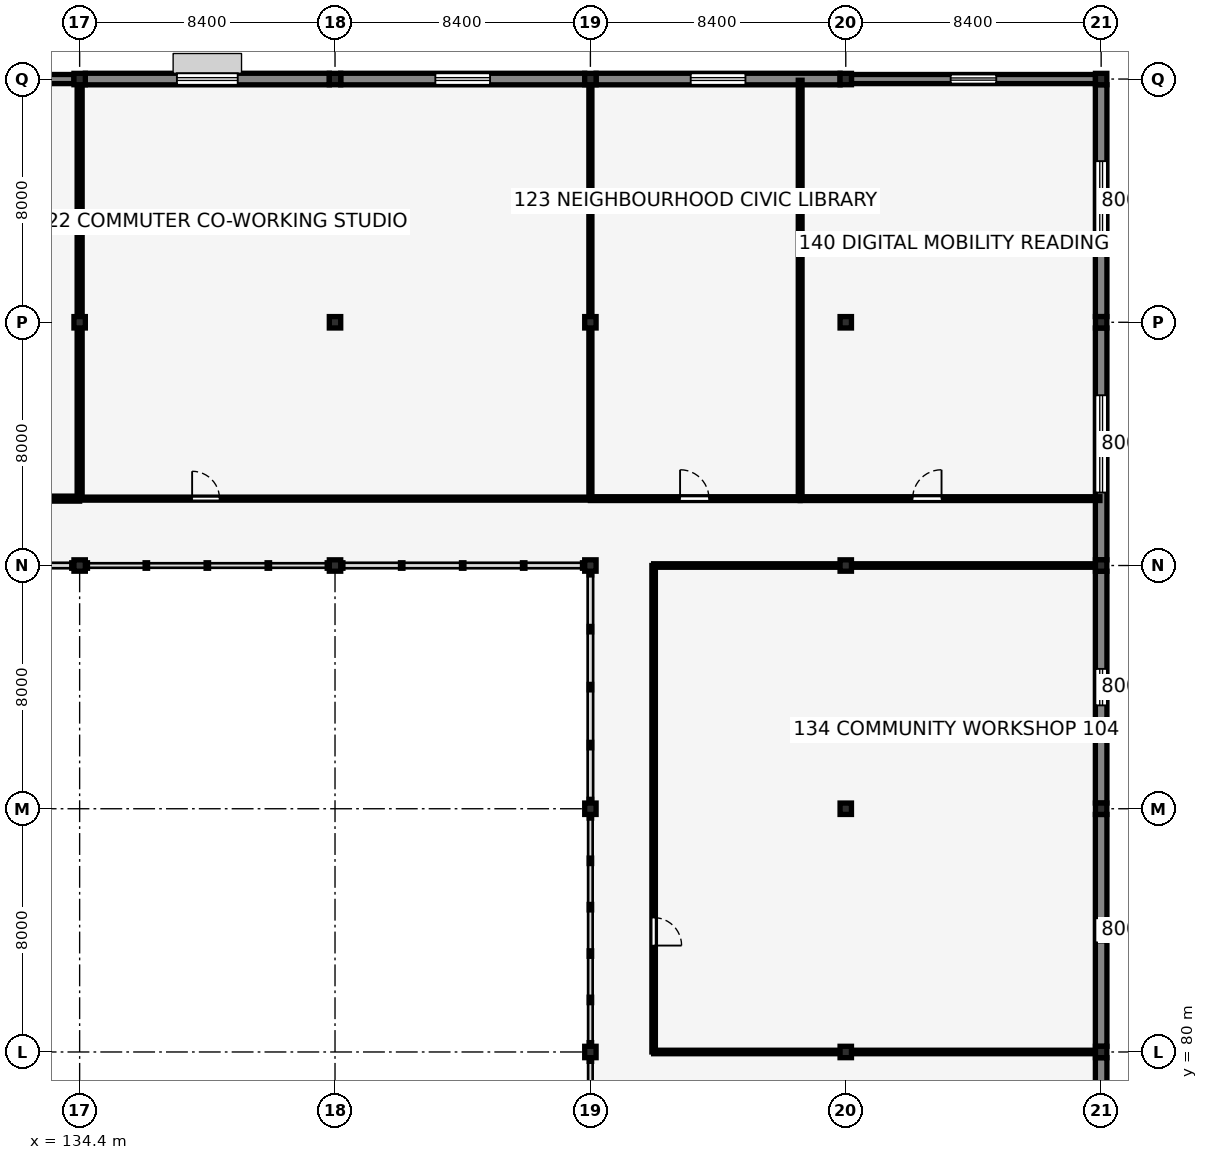
"""IFC4 building model, lengths in metres.
Left out: names, types, materials, properties, quantities, classifications, styles, units other than length and angle.
Written with IfcOpenShell. Run it as: python <this file> out.ifc"""

import sys

from ifc_helpers import new_model, si_unit, direction, frame, frame_2d, origin, origin_2d, place, context, subcontext, project, spatial, rectangle, i_section, extrude, element, fill, save


model = new_model("IFC4")
c1 = context("Model", 3, precision=1e-05, world=origin(), true_north=direction((0.0, 1.0)))
c2 = subcontext(c1, "Body", "Model", "MODEL_VIEW")
j1 = project(units=[si_unit("LENGTHUNIT", "METRE"), si_unit("PLANEANGLEUNIT", "RADIAN")], contexts=[c1])
p1 = place(None, origin())
s1 = spatial("IfcSite", under=j1, at=p1, CompositionType="ELEMENT")
p2 = place(p1, origin())
s2 = spatial("IfcBuilding", under=s1, at=p2, CompositionType="ELEMENT")
p3 = place(p2, frame((0.0, 0.0, 5.44)))
s3 = spatial("IfcBuildingStorey", under=s2, at=p3, CompositionType="ELEMENT", Elevation=5.44)
for number, where, z_axis, x_axis in (
    (1, (134.4, 96.0, 0.0), (0.0, 0.0, 1.0), (1.0, 0.0, 0.0)),
    (2, (134.4, 104.0, 0.0), (0.0, 0.0, 1.0), (1.0, 0.0, 0.0)),
    (3, (134.4, 112.0, 0.0), (0.0, 0.0, 1.0), (1.0, 0.0, 0.0)),
    (4, (142.8, 96.0, 0.0), (0.0, 0.0, 1.0), (1.0, 0.0, 0.0)),
    (5, (142.8, 104.0, 0.0), (0.0, 0.0, 1.0), (1.0, 0.0, 0.0)),
    (6, (142.8, 112.0, 0.0), (0.0, 0.0, 1.0), (1.0, 0.0, 0.0)),
    (7, (151.2, 80.0, 0.0), (0.0, 0.0, 1.0), (1.0, 0.0, 0.0)),
    (8, (151.2, 88.0, 0.0), (0.0, 0.0, 1.0), (1.0, 0.0, 0.0)),
    (9, (151.2, 96.0, 0.0), (0.0, 0.0, 1.0), (1.0, 0.0, 0.0)),
    (10, (151.2, 104.0, 0.0), (0.0, 0.0, 1.0), (1.0, 0.0, 0.0)),
    (11, (151.2, 112.0, 0.0), (0.0, 0.0, 1.0), (1.0, 0.0, 0.0)),
    (12, (159.6, 80.0, 0.0), (0.0, 0.0, 1.0), (1.0, 0.0, 0.0)),
    (13, (159.6, 88.0, 0.0), (0.0, 0.0, 1.0), (1.0, 0.0, 0.0)),
    (14, (159.6, 96.0, 0.0), (0.0, 0.0, 1.0), (1.0, 0.0, 0.0)),
    (15, (159.6, 104.0, 0.0), (0.0, 0.0, 1.0), (1.0, 0.0, 0.0)),
    (16, (159.6, 112.0, 0.0), (0.0, 0.0, 1.0), (1.0, 0.0, 0.0)),
    (17, (168.0, 80.0, 0.0), (0.0, 0.0, 1.0), (1.0, 0.0, 0.0)),
    (18, (168.0, 88.0, 0.0), (0.0, 0.0, 1.0), (1.0, 0.0, 0.0)),
    (19, (168.0, 96.0, 0.0), (0.0, 0.0, 1.0), (1.0, 0.0, 0.0)),
    (20, (168.0, 104.0, 0.0), (0.0, 0.0, 1.0), (1.0, 0.0, 0.0)),
    (21, (168.0, 112.0, 0.0), (0.0, 0.0, 1.0), (1.0, 0.0, 0.0)),
):
    element("IfcColumn", number, at=place(p3, frame(where, z_axis=z_axis, x_axis=x_axis)), inside=s3, PredefinedType="COLUMN", context=c2, shape_type="SweptSolid", body=[
        extrude(i_section(OverallWidth=0.375, OverallDepth=0.375, WebThickness=0.017, FlangeThickness=0.027, FilletRadius=0.015, at=origin_2d()), origin(), (0.0, 0.0, 1.0), 3.8),
    ])
p4 = place(p3, frame((126.187, 112.0, 0.0), z_axis=(0.0, 0.0, 1.0), x_axis=(1.0, 0.0, 0.0)))
e22 = element("IfcWall", 22, at=p4, inside=s3, PredefinedType="SOLIDWALL", context=c2, shape_type="SweptSolid", body=[
    extrude(rectangle(XDim=8.025, YDim=0.3, at=frame_2d((4.013, 0.0))), origin(), (0.0, 0.0, 1.0), 3.45),
])
p5 = place(p4, frame((2.913, 0.0, 0.9), z_axis=(0.0, 0.0, 1.0), x_axis=(1.0, 0.0, 0.0)))
e23 = element("IfcOpeningElement", 23, at=p5, cuts=e22, PredefinedType="OPENING", context=c2, shape_type="SweptSolid", body=[
    extrude(rectangle(XDim=2.2, YDim=1.5, at=frame_2d((1.1, 0.75))), frame((0.0, 0.16, 0.0), z_axis=(0.0, -1.0, 0.0), x_axis=(1.0, 0.0, 0.0)), (0.0, 0.0, 1.0), 0.32),
])
p6 = place(p3, frame((134.587, 112.0, 0.0), z_axis=(0.0, 0.0, 1.0), x_axis=(1.0, 0.0, 0.0)))
e24 = element("IfcWall", 24, at=p6, inside=s3, PredefinedType="SOLIDWALL", context=c2, shape_type="SweptSolid", body=[
    extrude(rectangle(XDim=8.025, YDim=0.38, at=frame_2d((4.013, 0.0))), origin(), (0.0, 0.0, 1.0), 3.45),
])
p7 = place(p6, frame((3.013, 0.0, 0.9), z_axis=(0.0, 0.0, 1.0), x_axis=(1.0, 0.0, 0.0)))
e25 = element("IfcOpeningElement", 25, at=p7, cuts=e24, PredefinedType="OPENING", context=c2, shape_type="SweptSolid", body=[
    extrude(rectangle(XDim=2.0, YDim=1.5, at=frame_2d((1.0, 0.75))), frame((0.0, 0.2, 0.0), z_axis=(0.0, -1.0, 0.0), x_axis=(1.0, 0.0, 0.0)), (0.0, 0.0, 1.0), 0.4),
])
p8 = place(p3, frame((142.987, 112.0, 0.0), z_axis=(0.0, 0.0, 1.0), x_axis=(1.0, 0.0, 0.0)))
e26 = element("IfcWall", 26, at=p8, inside=s3, PredefinedType="SOLIDWALL", context=c2, shape_type="SweptSolid", body=[
    extrude(rectangle(XDim=8.025, YDim=0.38, at=frame_2d((4.013, 0.0))), origin(), (0.0, 0.0, 1.0), 3.45),
])
p9 = place(p8, frame((3.113, 0.0, 0.9), z_axis=(0.0, 0.0, 1.0), x_axis=(1.0, 0.0, 0.0)))
e27 = element("IfcOpeningElement", 27, at=p9, cuts=e26, PredefinedType="OPENING", context=c2, shape_type="SweptSolid", body=[
    extrude(rectangle(XDim=1.8, YDim=1.45, at=frame_2d((0.9, 0.725))), frame((0.0, 0.2, 0.0), z_axis=(0.0, -1.0, 0.0), x_axis=(1.0, 0.0, 0.0)), (0.0, 0.0, 1.0), 0.4),
])
p10 = place(p3, frame((151.387, 112.0, 0.0), z_axis=(0.0, 0.0, 1.0), x_axis=(1.0, 0.0, 0.0)))
e28 = element("IfcWall", 28, at=p10, inside=s3, PredefinedType="SOLIDWALL", context=c2, shape_type="SweptSolid", body=[
    extrude(rectangle(XDim=8.025, YDim=0.38, at=frame_2d((4.013, 0.0))), origin(), (0.0, 0.0, 1.0), 3.45),
])
p11 = place(p10, frame((3.113, 0.0, 0.9), z_axis=(0.0, 0.0, 1.0), x_axis=(1.0, 0.0, 0.0)))
e29 = element("IfcOpeningElement", 29, at=p11, cuts=e28, PredefinedType="OPENING", context=c2, shape_type="SweptSolid", body=[
    extrude(rectangle(XDim=1.8, YDim=1.3, at=frame_2d((0.9, 0.65))), frame((0.0, 0.2, 0.0), z_axis=(0.0, -1.0, 0.0), x_axis=(1.0, 0.0, 0.0)), (0.0, 0.0, 1.0), 0.4),
])
p12 = place(p3, frame((159.787, 112.0, 0.0), z_axis=(0.0, 0.0, 1.0), x_axis=(1.0, 0.0, 0.0)))
e30 = element("IfcWall", 30, at=p12, inside=s3, PredefinedType="SOLIDWALL", context=c2, shape_type="SweptSolid", body=[
    extrude(rectangle(XDim=8.025, YDim=0.3, at=frame_2d((4.013, 0.0))), origin(), (0.0, 0.0, 1.0), 3.45),
])
p13 = place(p12, frame((3.263, 0.0, 0.9), z_axis=(0.0, 0.0, 1.0), x_axis=(1.0, 0.0, 0.0)))
e31 = element("IfcOpeningElement", 31, at=p13, cuts=e30, PredefinedType="OPENING", context=c2, shape_type="SweptSolid", body=[
    extrude(rectangle(XDim=1.5, YDim=1.4, at=frame_2d((0.75, 0.7))), frame((0.0, 0.16, 0.0), z_axis=(0.0, -1.0, 0.0), x_axis=(1.0, 0.0, 0.0)), (0.0, 0.0, 1.0), 0.32),
])
p14 = place(p3, frame((168.0, 96.187, 0.0), z_axis=(0.0, 0.0, 1.0), x_axis=(0.0, 1.0, 0.0)))
e32 = element("IfcWall", 32, at=p14, inside=s3, PredefinedType="SOLIDWALL", context=c2, shape_type="SweptSolid", body=[
    extrude(rectangle(XDim=7.625, YDim=0.38, at=frame_2d((3.813, 0.0))), origin(), (0.0, 0.0, 1.0), 3.442),
])
p15 = place(p14, frame((2.213, 0.0, 1.55), z_axis=(0.0, 0.0, 1.0), x_axis=(1.0, 0.0, 0.0)))
e33 = element("IfcOpeningElement", 33, at=p15, cuts=e32, PredefinedType="OPENING", context=c2, shape_type="SweptSolid", body=[
    extrude(rectangle(XDim=3.2, YDim=0.9, at=frame_2d((1.6, 0.45))), frame((0.0, 0.2, 0.0), z_axis=(0.0, -1.0, 0.0), x_axis=(1.0, 0.0, 0.0)), (0.0, 0.0, 1.0), 0.4),
])
p16 = place(p3, frame((168.0, 104.187, 0.0), z_axis=(0.0, 0.0, 1.0), x_axis=(0.0, 1.0, 0.0)))
e34 = element("IfcWall", 34, at=p16, inside=s3, PredefinedType="SOLIDWALL", context=c2, shape_type="SweptSolid", body=[
    extrude(rectangle(XDim=7.625, YDim=0.38, at=frame_2d((3.813, 0.0))), origin(), (0.0, 0.0, 1.0), 3.442),
])
p17 = place(p16, frame((2.513, 0.0, 1.55), z_axis=(0.0, 0.0, 1.0), x_axis=(1.0, 0.0, 0.0)))
e35 = element("IfcOpeningElement", 35, at=p17, cuts=e34, PredefinedType="OPENING", context=c2, shape_type="SweptSolid", body=[
    extrude(rectangle(XDim=2.6, YDim=0.85, at=frame_2d((1.3, 0.425))), frame((0.0, 0.2, 0.0), z_axis=(0.0, -1.0, 0.0), x_axis=(1.0, 0.0, 0.0)), (0.0, 0.0, 1.0), 0.4),
])
p18 = place(p3, frame((168.0, 72.187, 0.0), z_axis=(0.0, 0.0, 1.0), x_axis=(0.0, 1.0, 0.0)))
e36 = element("IfcWall", 36, at=p18, inside=s3, PredefinedType="SOLIDWALL", context=c2, shape_type="SweptSolid", body=[
    extrude(rectangle(XDim=7.625, YDim=0.38, at=frame_2d((3.813, 0.0))), origin(), (0.0, 0.0, 1.0), 3.5),
])
p19 = place(p3, frame((168.0, 80.187, 0.0), z_axis=(0.0, 0.0, 1.0), x_axis=(0.0, 1.0, 0.0)))
e37 = element("IfcWall", 37, at=p19, inside=s3, PredefinedType="SOLIDWALL", context=c2, shape_type="SweptSolid", body=[
    extrude(rectangle(XDim=7.625, YDim=0.38, at=frame_2d((3.813, 0.0))), origin(), (0.0, 0.0, 1.0), 3.442),
])
p20 = place(p19, frame((3.413, 0.0, 0.65), z_axis=(0.0, 0.0, 1.0), x_axis=(1.0, 0.0, 0.0)))
e38 = element("IfcOpeningElement", 38, at=p20, cuts=e37, PredefinedType="OPENING", context=c2, shape_type="SweptSolid", body=[
    extrude(rectangle(XDim=0.8, YDim=1.85, at=frame_2d((0.4, 0.925))), frame((0.0, 0.2, 0.0), z_axis=(0.0, -1.0, 0.0), x_axis=(1.0, 0.0, 0.0)), (0.0, 0.0, 1.0), 0.4),
])
p21 = place(p3, frame((168.0, 88.187, 0.0), z_axis=(0.0, 0.0, 1.0), x_axis=(0.0, 1.0, 0.0)))
e39 = element("IfcWall", 39, at=p21, inside=s3, PredefinedType="SOLIDWALL", context=c2, shape_type="SweptSolid", body=[
    extrude(rectangle(XDim=7.625, YDim=0.38, at=frame_2d((3.813, 0.0))), origin(), (0.0, 0.0, 1.0), 3.442),
])
p22 = place(p21, frame((3.213, 0.0, 1.55), z_axis=(0.0, 0.0, 1.0), x_axis=(1.0, 0.0, 0.0)))
e40 = element("IfcOpeningElement", 40, at=p22, cuts=e39, PredefinedType="OPENING", context=c2, shape_type="SweptSolid", body=[
    extrude(rectangle(XDim=1.2, YDim=0.95, at=frame_2d((0.6, 0.475))), frame((0.0, 0.2, 0.0), z_axis=(0.0, -1.0, 0.0), x_axis=(1.0, 0.0, 0.0)), (0.0, 0.0, 1.0), 0.4),
])
p23 = place(p3, frame((109.2, 98.2, 0.0), z_axis=(0.0, 0.0, 1.0), x_axis=(1.0, 0.0, 0.0)))
e41 = element("IfcWall", 41, at=p23, inside=s3, PredefinedType="PARTITIONING", context=c2, shape_type="SweptSolid", body=[
    extrude(rectangle(XDim=25.2, YDim=0.165, at=frame_2d((12.6, 0.0))), origin(), (0.0, 0.0, 1.0), 3.8),
])
p24 = place(p23, frame((3.7, 0.0, 0.0), z_axis=(0.0, 0.0, 1.0), x_axis=(1.0, 0.0, 0.0)))
e42 = element("IfcOpeningElement", 42, at=p24, cuts=e41, PredefinedType="OPENING", context=c2, shape_type="SweptSolid", body=[
    extrude(rectangle(XDim=1.1, YDim=2.2, at=frame_2d((0.55, 1.1))), frame((0.0, 0.093, 0.0), z_axis=(0.0, -1.0, 0.0), x_axis=(1.0, 0.0, 0.0)), (0.0, 0.0, 1.0), 0.185),
])
p25 = place(p3, frame((134.4, 98.2, 0.0), z_axis=(0.0, 0.0, 1.0), x_axis=(1.0, 0.0, 0.0)))
e43 = element("IfcWall", 43, at=p25, inside=s3, PredefinedType="PARTITIONING", context=c2, shape_type="SweptSolid", body=[
    extrude(rectangle(XDim=16.8, YDim=0.1, at=frame_2d((8.4, 0.0))), origin(), (0.0, 0.0, 1.0), 3.337),
])
p26 = place(p25, frame((3.7, 0.0, 0.0), z_axis=(0.0, 0.0, 1.0), x_axis=(1.0, 0.0, 0.0)))
e44 = element("IfcOpeningElement", 44, at=p26, cuts=e43, PredefinedType="OPENING", context=c2, shape_type="SweptSolid", body=[
    extrude(rectangle(XDim=0.9, YDim=2.1, at=frame_2d((0.45, 1.05))), frame((0.0, 0.06, 0.0), z_axis=(0.0, -1.0, 0.0), x_axis=(1.0, 0.0, 0.0)), (0.0, 0.0, 1.0), 0.12),
])
p27 = place(p3, frame((151.2, 98.2, 0.0), z_axis=(0.0, 0.0, 1.0), x_axis=(1.0, 0.0, 0.0)))
e45 = element("IfcWall", 45, at=p27, inside=s3, PredefinedType="PARTITIONING", context=c2, shape_type="SweptSolid", body=[
    extrude(rectangle(XDim=6.9, YDim=0.125, at=frame_2d((3.45, 0.0))), origin(), (0.0, 0.0, 1.0), 3.8),
])
p28 = place(p27, frame((2.95, 0.0, 0.0), z_axis=(0.0, 0.0, 1.0), x_axis=(1.0, 0.0, 0.0)))
e46 = element("IfcOpeningElement", 46, at=p28, cuts=e45, PredefinedType="OPENING", context=c2, shape_type="SweptSolid", body=[
    extrude(rectangle(XDim=0.95, YDim=2.15, at=frame_2d((0.475, 1.075))), frame((0.0, 0.073, 0.0), z_axis=(0.0, -1.0, 0.0), x_axis=(1.0, 0.0, 0.0)), (0.0, 0.0, 1.0), 0.145),
])
p29 = place(p3, frame((158.1, 98.2, 0.0), z_axis=(0.0, 0.0, 1.0), x_axis=(1.0, 0.0, 0.0)))
e47 = element("IfcWall", 47, at=p29, inside=s3, PredefinedType="PARTITIONING", context=c2, shape_type="SweptSolid", body=[
    extrude(rectangle(XDim=9.86, YDim=0.125, at=frame_2d((4.93, 0.0))), origin(), (0.0, 0.0, 1.0), 3.337),
])
p30 = place(p29, frame((3.7, 0.0, 0.0), z_axis=(0.0, 0.0, 1.0), x_axis=(1.0, 0.0, 0.0)))
e48 = element("IfcOpeningElement", 48, at=p30, cuts=e47, PredefinedType="OPENING", context=c2, shape_type="SweptSolid", body=[
    extrude(rectangle(XDim=0.95, YDim=2.15, at=frame_2d((0.475, 1.075))), frame((0.0, 0.073, 0.0), z_axis=(0.0, -1.0, 0.0), x_axis=(1.0, 0.0, 0.0)), (0.0, 0.0, 1.0), 0.145),
])
p31 = place(p3, frame((153.28, 80.0, 0.0), z_axis=(0.0, 0.0, 1.0), x_axis=(0.0, 1.0, 0.0)))
e49 = element("IfcWall", 49, at=p31, inside=s3, PredefinedType="PARTITIONING", context=c2, shape_type="SweptSolid", body=[
    extrude(rectangle(XDim=16.0, YDim=0.115, at=frame_2d((8.0, 0.0))), origin(), (0.0, 0.0, 1.0), 3.8),
])
p32 = place(p31, frame((4.42, 0.0, 0.0), z_axis=(0.0, 0.0, 1.0), x_axis=(-1.0, 0.0, 0.0)))
e50 = element("IfcOpeningElement", 50, at=p32, cuts=e49, PredefinedType="OPENING", context=c2, shape_type="SweptSolid", body=[
    extrude(rectangle(XDim=0.92, YDim=2.12, at=frame_2d((0.46, 1.06))), frame((0.0, 0.067, 0.0), z_axis=(0.0, -1.0, 0.0), x_axis=(1.0, 0.0, 0.0)), (0.0, 0.0, 1.0), 0.135),
])
p33 = place(p3, frame((134.4, 98.2, 0.0), z_axis=(0.0, 0.0, 1.0), x_axis=(0.0, 1.0, 0.0)))
e51 = element("IfcWall", 51, at=p33, inside=s3, PredefinedType="PARTITIONING", context=c2, shape_type="SweptSolid", body=[
    extrude(rectangle(XDim=5.623, YDim=0.165, at=frame_2d((2.812, 0.0))), origin(), (0.0, 0.0, 1.0), 3.337),
])
p34 = place(p3, frame((134.4, 104.177, 0.0), z_axis=(0.0, 0.0, 1.0), x_axis=(0.0, 1.0, 0.0)))
e52 = element("IfcWall", 52, at=p34, inside=s3, PredefinedType="PARTITIONING", context=c2, shape_type="SweptSolid", body=[
    extrude(rectangle(XDim=7.646, YDim=0.165, at=frame_2d((3.823, 0.0))), origin(), (0.0, 0.0, 1.0), 3.337),
])
p35 = place(p3, frame((151.2, 98.2, 0.0), z_axis=(0.0, 0.0, 1.0), x_axis=(0.0, 1.0, 0.0)))
e53 = element("IfcWall", 53, at=p35, inside=s3, PredefinedType="PARTITIONING", context=c2, shape_type="SweptSolid", body=[
    extrude(rectangle(XDim=5.623, YDim=0.1, at=frame_2d((2.812, 0.0))), origin(), (0.0, 0.0, 1.0), 3.337),
])
p36 = place(p3, frame((151.2, 104.177, 0.0), z_axis=(0.0, 0.0, 1.0), x_axis=(0.0, 1.0, 0.0)))
e54 = element("IfcWall", 54, at=p36, inside=s3, PredefinedType="PARTITIONING", context=c2, shape_type="SweptSolid", body=[
    extrude(rectangle(XDim=7.646, YDim=0.1, at=frame_2d((3.823, 0.0))), origin(), (0.0, 0.0, 1.0), 3.337),
])
p37 = place(p3, frame((158.1, 98.2, 0.0), z_axis=(0.0, 0.0, 1.0), x_axis=(0.0, 1.0, 0.0)))
e55 = element("IfcWall", 55, at=p37, inside=s3, PredefinedType="PARTITIONING", context=c2, shape_type="SweptSolid", body=[
    extrude(rectangle(XDim=13.76, YDim=0.125, at=frame_2d((6.88, 0.0))), origin(), (0.0, 0.0, 1.0), 3.8),
])
p38 = place(p3, frame((153.28, 80.0, 0.0), z_axis=(0.0, 0.0, 1.0), x_axis=(1.0, 0.0, 0.0)))
e56 = element("IfcWall", 56, at=p38, inside=s3, PredefinedType="PARTITIONING", context=c2, shape_type="SweptSolid", body=[
    extrude(rectangle(XDim=6.143, YDim=0.115, at=frame_2d((3.071, 0.0))), origin(), (0.0, 0.0, 1.0), 3.26),
])
p39 = place(p3, frame((159.777, 80.0, 0.0), z_axis=(0.0, 0.0, 1.0), x_axis=(1.0, 0.0, 0.0)))
e57 = element("IfcWall", 57, at=p39, inside=s3, PredefinedType="PARTITIONING", context=c2, shape_type="SweptSolid", body=[
    extrude(rectangle(XDim=8.045, YDim=0.115, at=frame_2d((4.023, 0.0))), origin(), (0.0, 0.0, 1.0), 3.26),
])
p40 = place(p3, frame((153.28, 96.0, 0.0), z_axis=(0.0, 0.0, 1.0), x_axis=(1.0, 0.0, 0.0)))
e58 = element("IfcWall", 58, at=p40, inside=s3, PredefinedType="PARTITIONING", context=c2, shape_type="SweptSolid", body=[
    extrude(rectangle(XDim=6.143, YDim=0.115, at=frame_2d((3.071, 0.0))), origin(), (0.0, 0.0, 1.0), 3.26),
])
p41 = place(p3, frame((159.777, 96.0, 0.0), z_axis=(0.0, 0.0, 1.0), x_axis=(1.0, 0.0, 0.0)))
e59 = element("IfcWall", 59, at=p41, inside=s3, PredefinedType="PARTITIONING", context=c2, shape_type="SweptSolid", body=[
    extrude(rectangle(XDim=8.045, YDim=0.115, at=frame_2d((4.023, 0.0))), origin(), (0.0, 0.0, 1.0), 3.26),
])
p42 = place(p7, origin())
e60 = element("IfcWindow", 60, at=p42, inside=s3, PartitioningType="DOUBLE_PANEL_VERTICAL", PredefinedType="WINDOW", context=c2, shape_type="SweptSolid", body=[
    extrude(rectangle(XDim=2.0, YDim=1.5, at=frame_2d((1.0, 0.75))), frame((0.0, 0.03, 0.0), z_axis=(0.0, -1.0, 0.0), x_axis=(1.0, 0.0, 0.0)), (0.0, 0.0, 1.0), 0.06),
])
fill(e25, e60)
p43 = place(p9, origin())
e61 = element("IfcWindow", 61, at=p43, inside=s3, PartitioningType="DOUBLE_PANEL_VERTICAL", PredefinedType="WINDOW", context=c2, shape_type="SweptSolid", body=[
    extrude(rectangle(XDim=1.8, YDim=1.45, at=frame_2d((0.9, 0.725))), frame((0.0, 0.03, 0.0), z_axis=(0.0, -1.0, 0.0), x_axis=(1.0, 0.0, 0.0)), (0.0, 0.0, 1.0), 0.06),
])
fill(e27, e61)
p44 = place(p11, origin())
e62 = element("IfcWindow", 62, at=p44, inside=s3, PartitioningType="DOUBLE_PANEL_VERTICAL", PredefinedType="WINDOW", context=c2, shape_type="SweptSolid", body=[
    extrude(rectangle(XDim=1.8, YDim=1.3, at=frame_2d((0.9, 0.65))), frame((0.0, 0.03, 0.0), z_axis=(0.0, -1.0, 0.0), x_axis=(1.0, 0.0, 0.0)), (0.0, 0.0, 1.0), 0.06),
])
fill(e29, e62)
p45 = place(p13, origin())
e63 = element("IfcWindow", 63, at=p45, inside=s3, PartitioningType="SINGLE_PANEL", PredefinedType="WINDOW", context=c2, shape_type="SweptSolid", body=[
    extrude(rectangle(XDim=1.5, YDim=1.4, at=frame_2d((0.75, 0.7))), frame((0.0, 0.03, 0.0), z_axis=(0.0, -1.0, 0.0), x_axis=(1.0, 0.0, 0.0)), (0.0, 0.0, 1.0), 0.06),
])
fill(e31, e63)
p46 = place(p15, origin())
e64 = element("IfcWindow", 64, at=p46, inside=s3, PartitioningType="TRIPLE_PANEL_HORIZONTAL", PredefinedType="WINDOW", context=c2, shape_type="SweptSolid", body=[
    extrude(rectangle(XDim=3.2, YDim=0.9, at=frame_2d((1.6, 0.45))), frame((0.0, 0.03, 0.0), z_axis=(0.0, -1.0, 0.0), x_axis=(1.0, 0.0, 0.0)), (0.0, 0.0, 1.0), 0.06),
])
fill(e33, e64)
p47 = place(p17, origin())
e65 = element("IfcWindow", 65, at=p47, inside=s3, PartitioningType="DOUBLE_PANEL_HORIZONTAL", PredefinedType="WINDOW", context=c2, shape_type="SweptSolid", body=[
    extrude(rectangle(XDim=2.6, YDim=0.85, at=frame_2d((1.3, 0.425))), frame((0.0, 0.03, 0.0), z_axis=(0.0, -1.0, 0.0), x_axis=(1.0, 0.0, 0.0)), (0.0, 0.0, 1.0), 0.06),
])
fill(e35, e65)
p48 = place(p20, origin())
e66 = element("IfcWindow", 66, at=p48, inside=s3, PartitioningType="SINGLE_PANEL", PredefinedType="WINDOW", context=c2, shape_type="SweptSolid", body=[
    extrude(rectangle(XDim=0.8, YDim=1.85, at=frame_2d((0.4, 0.925))), frame((0.0, 0.03, 0.0), z_axis=(0.0, -1.0, 0.0), x_axis=(1.0, 0.0, 0.0)), (0.0, 0.0, 1.0), 0.06),
])
fill(e38, e66)
p49 = place(p22, origin())
e67 = element("IfcWindow", 67, at=p49, inside=s3, PartitioningType="SINGLE_PANEL", PredefinedType="WINDOW", context=c2, shape_type="SweptSolid", body=[
    extrude(rectangle(XDim=1.2, YDim=0.95, at=frame_2d((0.6, 0.475))), frame((0.0, 0.03, 0.0), z_axis=(0.0, -1.0, 0.0), x_axis=(1.0, 0.0, 0.0)), (0.0, 0.0, 1.0), 0.06),
])
fill(e40, e67)
p50 = place(p26, origin())
e68 = element("IfcDoor", 68, at=p50, inside=s3, OperationType="SINGLE_SWING_LEFT", PredefinedType="DOOR", context=c2, shape_type="SweptSolid", body=[
    extrude(rectangle(XDim=0.9, YDim=2.1, at=frame_2d((0.45, 1.05))), frame((0.0, 0.025, 0.0), z_axis=(0.0, -1.0, 0.0), x_axis=(1.0, 0.0, 0.0)), (0.0, 0.0, 1.0), 0.05),
])
fill(e44, e68)
p51 = place(p28, origin())
e69 = element("IfcDoor", 69, at=p51, inside=s3, OperationType="SINGLE_SWING_LEFT", PredefinedType="DOOR", context=c2, shape_type="SweptSolid", body=[
    extrude(rectangle(XDim=0.95, YDim=2.15, at=frame_2d((0.475, 1.075))), frame((0.0, 0.025, 0.0), z_axis=(0.0, -1.0, 0.0), x_axis=(1.0, 0.0, 0.0)), (0.0, 0.0, 1.0), 0.05),
])
fill(e46, e69)
p52 = place(p30, origin())
e70 = element("IfcDoor", 70, at=p52, inside=s3, OperationType="SINGLE_SWING_RIGHT", PredefinedType="DOOR", context=c2, shape_type="SweptSolid", body=[
    extrude(rectangle(XDim=0.95, YDim=2.15, at=frame_2d((0.475, 1.075))), frame((0.0, 0.025, 0.0), z_axis=(0.0, -1.0, 0.0), x_axis=(1.0, 0.0, 0.0)), (0.0, 0.0, 1.0), 0.05),
])
fill(e48, e70)
p53 = place(p32, origin())
e71 = element("IfcDoor", 71, at=p53, inside=s3, OperationType="SINGLE_SWING_RIGHT", PredefinedType="DOOR", context=c2, shape_type="SweptSolid", body=[
    extrude(rectangle(XDim=0.92, YDim=2.12, at=frame_2d((0.46, 1.06))), frame((0.0, 0.025, 0.0), z_axis=(0.0, -1.0, 0.0), x_axis=(1.0, 0.0, 0.0)), (0.0, 0.0, 1.0), 0.05),
])
fill(e50, e71)
save(model, sys.argv[1])
